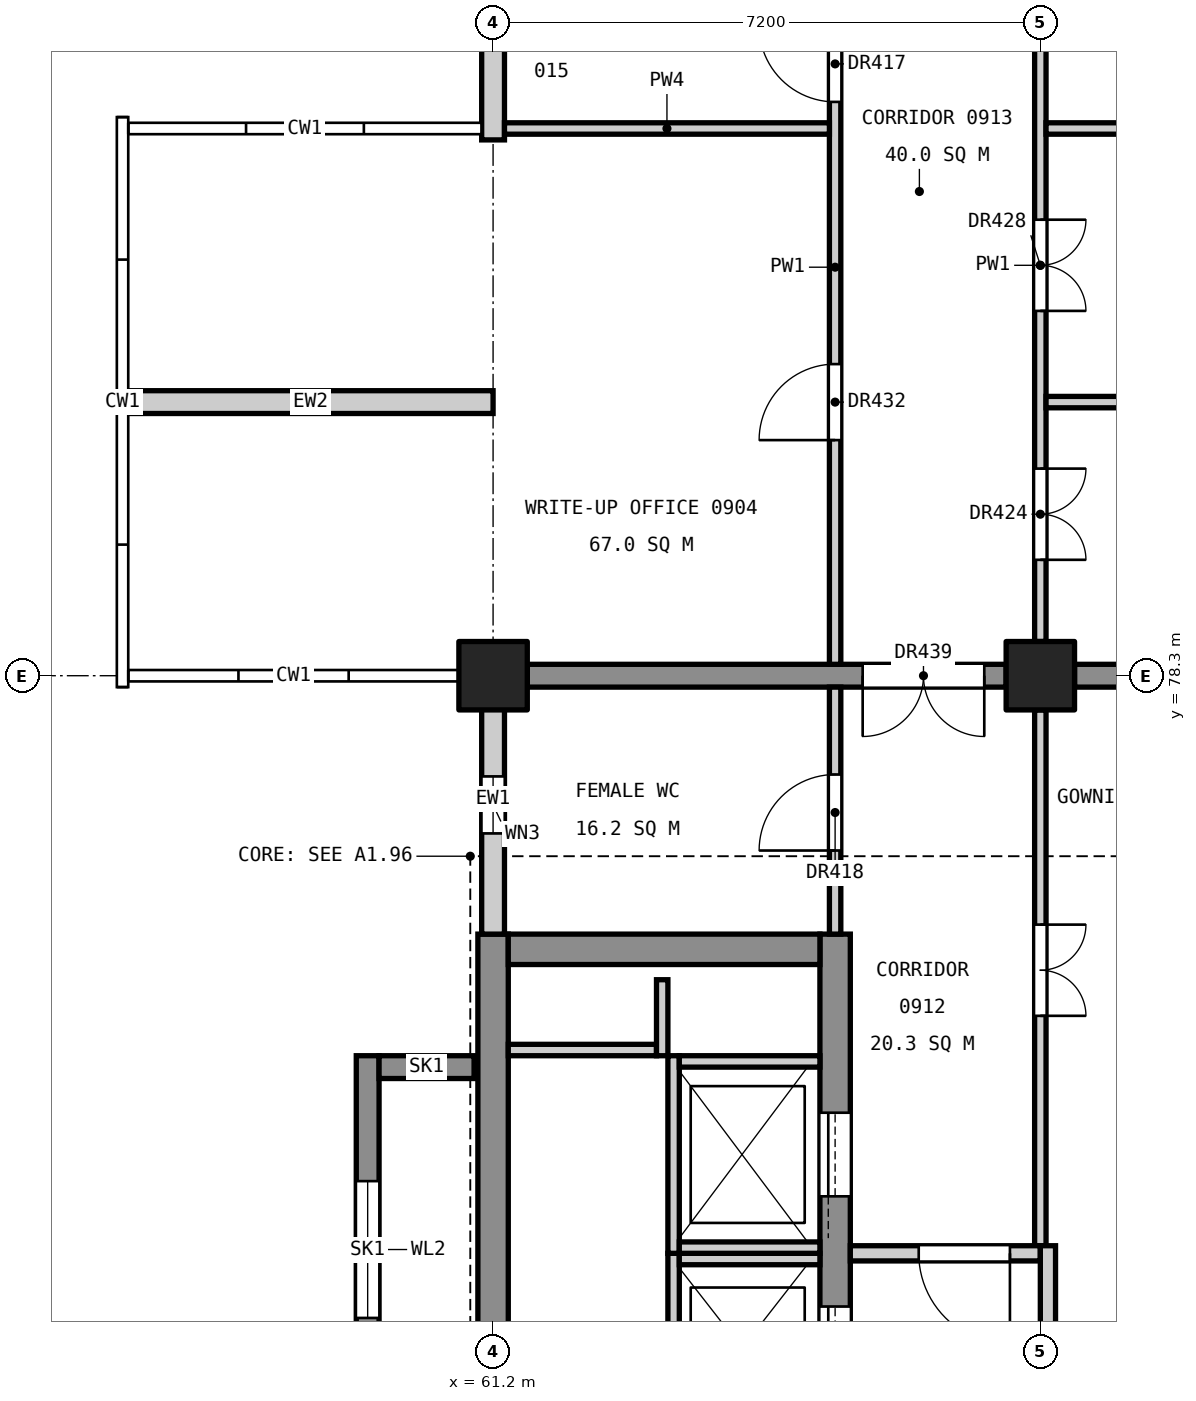
"""IFC4 building model, lengths in metres.
Left out: names, types, materials, properties, quantities, classifications, styles, units other than length and angle.
Written with IfcOpenShell. Run it as: python <this file> out.ifc"""

import sys

from ifc_helpers import new_model, si_unit, direction, frame, frame_2d, origin, origin_2d, place, context, subcontext, project, spatial, rectangle, extrude, element, fill, save


model = new_model("IFC4")
c1 = context("Model", 3, precision=1e-05, world=origin(), true_north=direction((0.0, 1.0)))
c2 = subcontext(c1, "Body", "Model", "MODEL_VIEW")
j1 = project(units=[si_unit("LENGTHUNIT", "METRE"), si_unit("PLANEANGLEUNIT", "RADIAN")], contexts=[c1])
p1 = place(None, origin())
s1 = spatial("IfcSite", under=j1, at=p1, CompositionType="ELEMENT")
p2 = place(p1, origin())
s2 = spatial("IfcBuilding", under=s1, at=p2, CompositionType="ELEMENT")
p3 = place(p2, frame((0.0, 0.0, 46.2)))
s3 = spatial("IfcBuildingStorey", under=s2, at=p3, CompositionType="ELEMENT", Elevation=46.2)
for number, where, z_axis, x_axis in (
    (1, (61.2, 78.3, 0.0), (0.0, 0.0, 1.0), (1.0, 0.0, 0.0)),
    (2, (68.4, 78.3, 0.0), (0.0, 0.0, 1.0), (1.0, 0.0, 0.0)),
):
    element("IfcColumn", number, at=place(p3, frame(where, z_axis=z_axis, x_axis=x_axis)), inside=s3, PredefinedType="COLUMN", context=c2, shape_type="SweptSolid", body=[
        extrude(rectangle(XDim=0.9, YDim=0.9, at=origin_2d()), origin(), (0.0, 0.0, 1.0), 4.8),
    ])
p4 = place(p3, frame((61.2, 60.1, 0.0), z_axis=(0.0, 0.0, 1.0), x_axis=(0.0, 1.0, 0.0)))
e3 = element("IfcWall", 3, at=p4, inside=s3, PredefinedType="SHEAR", context=c2, shape_type="SweptSolid", body=[
    extrude(rectangle(XDim=14.8, YDim=0.4, at=frame_2d((7.4, 0.0))), origin(), (0.0, 0.0, 1.0), 4.55),
])
p5 = place(p4, frame((6.11, 0.0, 3.4)))
e4 = element("IfcOpeningElement", 4, at=p5, cuts=e3, PredefinedType="OPENING", context=c2, shape_type="SweptSolid", body=[
    extrude(rectangle(XDim=1.2, YDim=0.9, at=frame_2d((0.6, 0.45))), frame((0.0, 0.21, 0.0), z_axis=(0.0, -1.0, 0.0), x_axis=(1.0, 0.0, 0.0)), (0.0, 0.0, 1.0), 0.42),
])
p6 = place(p3, frame((65.7, 60.1, 0.0), z_axis=(0.0, 0.0, 1.0), x_axis=(0.0, 1.0, 0.0)))
e5 = element("IfcWall", 5, at=p6, inside=s3, PredefinedType="SHEAR", context=c2, shape_type="SweptSolid", body=[
    extrude(rectangle(XDim=14.8, YDim=0.4, at=frame_2d((7.4, 0.0))), origin(), (0.0, 0.0, 1.0), 4.55),
])
p7 = place(p6, frame((0.5, 0.0, 0.0)))
e6 = element("IfcOpeningElement", 6, at=p7, cuts=e5, PredefinedType="OPENING", context=c2, shape_type="SweptSolid", body=[
    extrude(rectangle(XDim=1.4, YDim=2.1, at=frame_2d((0.7, 1.05))), frame((0.0, 0.21, 0.0), z_axis=(0.0, -1.0, 0.0), x_axis=(1.0, 0.0, 0.0)), (0.0, 0.0, 1.0), 0.42),
])
p8 = place(p6, frame((8.8, 0.0, 0.0)))
e7 = element("IfcOpeningElement", 7, at=p8, cuts=e5, PredefinedType="OPENING", context=c2, shape_type="SweptSolid", body=[
    extrude(rectangle(XDim=1.1, YDim=2.1, at=frame_2d((0.55, 1.05))), frame((0.0, 0.21, 0.0), z_axis=(0.0, -1.0, 0.0), x_axis=(1.0, 0.0, 0.0)), (0.0, 0.0, 1.0), 0.42),
])
p9 = place(p6, frame((11.35, 0.0, 0.0)))
e8 = element("IfcOpeningElement", 8, at=p9, cuts=e5, PredefinedType="OPENING", context=c2, shape_type="SweptSolid", body=[
    extrude(rectangle(XDim=1.1, YDim=2.1, at=frame_2d((0.55, 1.05))), frame((0.0, 0.21, 0.0), z_axis=(0.0, -1.0, 0.0), x_axis=(1.0, 0.0, 0.0)), (0.0, 0.0, 1.0), 0.42),
])
p10 = place(p3, frame((61.4, 74.7, 0.0), z_axis=(0.0, 0.0, 1.0), x_axis=(1.0, 0.0, 0.0)))
e9 = element("IfcWall", 9, at=p10, inside=s3, PredefinedType="SHEAR", context=c2, shape_type="SweptSolid", body=[
    extrude(rectangle(XDim=4.1, YDim=0.4, at=frame_2d((2.05, 0.0))), origin(), (0.0, 0.0, 1.0), 4.55),
])
p11 = place(p3, frame((59.55, 68.2, 0.0), z_axis=(0.0, 0.0, 1.0), x_axis=(0.0, 1.0, 0.0)))
e10 = element("IfcWall", 10, at=p11, inside=s3, PredefinedType="SHEAR", context=c2, shape_type="SweptSolid", body=[
    extrude(rectangle(XDim=5.1, YDim=0.3, at=frame_2d((2.55, 0.0))), origin(), (0.0, 0.0, 1.0), 4.8),
])
p12 = place(p11, frame((1.65, 0.0, 3.0)))
e11 = element("IfcOpeningElement", 11, at=p12, cuts=e10, PredefinedType="OPENING", context=c2, shape_type="SweptSolid", body=[
    extrude(rectangle(XDim=1.8, YDim=1.2, at=frame_2d((0.9, 0.6))), frame((0.0, 0.16, 0.0), z_axis=(0.0, -1.0, 0.0), x_axis=(1.0, 0.0, 0.0)), (0.0, 0.0, 1.0), 0.32),
])
p13 = place(p3, frame((60.95, 73.15, 0.0), z_axis=(0.0, 0.0, 1.0), x_axis=(-1.0, 0.0, 0.0)))
e12 = element("IfcWall", 12, at=p13, inside=s3, PredefinedType="SHEAR", context=c2, shape_type="SweptSolid", body=[
    extrude(rectangle(XDim=1.25, YDim=0.3, at=frame_2d((0.625, 0.0))), origin(), (0.0, 0.0, 1.0), 4.8),
])
p14 = place(p3, frame((61.65, 78.3, 0.0), z_axis=(0.0, 0.0, 1.0), x_axis=(1.0, 0.0, 0.0)))
e13 = element("IfcWall", 13, at=p14, inside=s3, PredefinedType="SHEAR", context=c2, shape_type="SweptSolid", body=[
    extrude(rectangle(XDim=6.3, YDim=0.3, at=frame_2d((3.15, 0.0))), origin(), (0.0, 0.0, 1.0), 4.55),
])
p15 = place(p14, frame((4.413, 0.0, 0.0)))
e14 = element("IfcOpeningElement", 14, at=p15, cuts=e13, PredefinedType="OPENING", context=c2, shape_type="SweptSolid", body=[
    extrude(rectangle(XDim=1.6, YDim=2.1, at=frame_2d((0.8, 1.05))), frame((0.0, 0.16, 0.0), z_axis=(0.0, -1.0, 0.0), x_axis=(1.0, 0.0, 0.0)), (0.0, 0.0, 1.0), 0.32),
])
p16 = place(p3, frame((68.85, 78.3, 0.0), z_axis=(0.0, 0.0, 1.0), x_axis=(1.0, 0.0, 0.0)))
e15 = element("IfcWall", 15, at=p16, inside=s3, PredefinedType="SHEAR", context=c2, shape_type="SweptSolid", body=[
    extrude(rectangle(XDim=9.9, YDim=0.3, at=frame_2d((4.95, 0.0))), origin(), (0.0, 0.0, 1.0), 4.55),
])
p17 = place(p3, frame((63.575, 68.2, 0.0), z_axis=(0.0, 0.0, 1.0), x_axis=(0.0, 1.0, 0.0)))
e16 = element("IfcWall", 16, at=p17, inside=s3, PredefinedType="SOLIDWALL", context=c2, shape_type="SweptSolid", body=[
    extrude(rectangle(XDim=2.5, YDim=0.15, at=frame_2d((1.25, 0.0))), origin(), (0.0, 0.0, 1.0), 4.8),
])
p18 = place(p3, frame((63.65, 70.625, 0.0), z_axis=(0.0, 0.0, 1.0), x_axis=(1.0, 0.0, 0.0)))
e17 = element("IfcWall", 17, at=p18, inside=s3, PredefinedType="SOLIDWALL", context=c2, shape_type="SweptSolid", body=[
    extrude(rectangle(XDim=1.85, YDim=0.15, at=frame_2d((0.925, 0.0))), origin(), (0.0, 0.0, 1.0), 4.8),
])
p19 = place(p3, frame((63.575, 70.7, 0.0), z_axis=(0.0, 0.0, 1.0), x_axis=(0.0, 1.0, 0.0)))
e18 = element("IfcWall", 18, at=p19, inside=s3, PredefinedType="SOLIDWALL", context=c2, shape_type="SweptSolid", body=[
    extrude(rectangle(XDim=2.6, YDim=0.15, at=frame_2d((1.3, 0.0))), origin(), (0.0, 0.0, 1.0), 4.8),
])
for number, where, z_axis, x_axis in (
    (19, (63.65, 70.775, 0.0), (0.0, 0.0, 1.0), (1.0, 0.0, 0.0)),
    (20, (63.65, 73.225, 0.0), (0.0, 0.0, 1.0), (1.0, 0.0, 0.0)),
):
    element("IfcWall", number, at=place(p3, frame(where, z_axis=z_axis, x_axis=x_axis)), inside=s3, PredefinedType="SOLIDWALL", context=c2, shape_type="SweptSolid", body=[
        extrude(rectangle(XDim=1.85, YDim=0.15, at=frame_2d((0.925, 0.0))), origin(), (0.0, 0.0, 1.0), 4.8),
    ])
p20 = place(p3, frame((61.4, 73.375, 0.0), z_axis=(0.0, 0.0, 1.0), x_axis=(1.0, 0.0, 0.0)))
e21 = element("IfcWall", 21, at=p20, inside=s3, PredefinedType="SOLIDWALL", context=c2, shape_type="SweptSolid", body=[
    extrude(rectangle(XDim=1.95, YDim=0.15, at=frame_2d((0.975, 0.0))), origin(), (0.0, 0.0, 1.0), 4.8),
])
p21 = place(p3, frame((63.425, 73.3, 0.0), z_axis=(0.0, 0.0, 1.0), x_axis=(0.0, 1.0, 0.0)))
e22 = element("IfcWall", 22, at=p21, inside=s3, PredefinedType="SOLIDWALL", context=c2, shape_type="SweptSolid", body=[
    extrude(rectangle(XDim=1.0, YDim=0.15, at=frame_2d((0.5, 0.0))), origin(), (0.0, 0.0, 1.0), 4.8),
])
p22 = place(p3, frame((61.2, 74.9, 0.0), z_axis=(0.0, 0.0, 1.0), x_axis=(0.0, 1.0, 0.0)))
e23 = element("IfcWall", 23, at=p22, inside=s3, PredefinedType="STANDARD", context=c2, shape_type="SweptSolid", body=[
    extrude(rectangle(XDim=3.55, YDim=0.3, at=frame_2d((1.775, 0.0))), origin(), (0.0, 0.0, 1.0), 3.65),
])
p23 = place(p22, frame((1.325, 0.0, 0.8)))
e24 = element("IfcOpeningElement", 24, at=p23, cuts=e23, PredefinedType="OPENING", context=c2, shape_type="SweptSolid", body=[
    extrude(rectangle(XDim=0.75, YDim=1.2, at=frame_2d((0.375, 0.6))), frame((0.0, 0.16, 0.0), z_axis=(0.0, -1.0, 0.0), x_axis=(1.0, 0.0, 0.0)), (0.0, 0.0, 1.0), 0.32),
])
p24 = place(p3, frame((61.2, 85.35, 0.0), z_axis=(0.0, 0.0, 1.0), x_axis=(0.0, 1.0, 0.0)))
e25 = element("IfcWall", 25, at=p24, inside=s3, PredefinedType="STANDARD", context=c2, shape_type="SweptSolid", body=[
    extrude(rectangle(XDim=3.55, YDim=0.3, at=frame_2d((1.775, 0.0))), origin(), (0.0, 0.0, 1.0), 3.65),
])
p25 = place(p3, frame((56.4, 81.9, 0.0), z_axis=(0.0, 0.0, 1.0), x_axis=(1.0, 0.0, 0.0)))
e26 = element("IfcWall", 26, at=p25, inside=s3, PredefinedType="STANDARD", context=c2, shape_type="SweptSolid", body=[
    extrude(rectangle(XDim=4.8, YDim=0.3, at=frame_2d((2.4, 0.0))), origin(), (0.0, 0.0, 1.0), 3.65),
])
p26 = place(p3, frame((65.7, 74.9, 0.0), z_axis=(0.0, 0.0, 1.0), x_axis=(0.0, 1.0, 0.0)))
e27 = element("IfcWall", 27, at=p26, inside=s3, PredefinedType="PARTITIONING", context=c2, shape_type="SweptSolid", body=[
    extrude(rectangle(XDim=3.25, YDim=0.15, at=frame_2d((1.625, 0.0))), origin(), (0.0, 0.0, 1.0), 3.55),
])
p27 = place(p26, frame((1.1, 0.0, 0.0)))
e28 = element("IfcOpeningElement", 28, at=p27, cuts=e27, PredefinedType="OPENING", context=c2, shape_type="SweptSolid", body=[
    extrude(rectangle(XDim=1.0, YDim=2.1, at=frame_2d((0.5, 1.05))), frame((0.0, 0.085, 0.0), z_axis=(0.0, -1.0, 0.0), x_axis=(1.0, 0.0, 0.0)), (0.0, 0.0, 1.0), 0.17),
])
p28 = place(p3, frame((65.7, 78.45, 0.0), z_axis=(0.0, 0.0, 1.0), x_axis=(0.0, 1.0, 0.0)))
e29 = element("IfcWall", 29, at=p28, inside=s3, PredefinedType="PARTITIONING", context=c2, shape_type="SweptSolid", body=[
    extrude(rectangle(XDim=10.45, YDim=0.15, at=frame_2d((5.225, 0.0))), origin(), (0.0, 0.0, 1.0), 3.55),
])
p29 = place(p28, frame((7.4, 0.0, 0.0)))
e30 = element("IfcOpeningElement", 30, at=p29, cuts=e29, PredefinedType="OPENING", context=c2, shape_type="SweptSolid", body=[
    extrude(rectangle(XDim=1.0, YDim=2.1, at=frame_2d((0.5, 1.05))), frame((0.0, 0.085, 0.0), z_axis=(0.0, -1.0, 0.0), x_axis=(1.0, 0.0, 0.0)), (0.0, 0.0, 1.0), 0.17),
])
p30 = place(p28, frame((9.2, 0.0, 0.0)))
e31 = element("IfcOpeningElement", 31, at=p30, cuts=e29, PredefinedType="OPENING", context=c2, shape_type="SweptSolid", body=[
    extrude(rectangle(XDim=1.0, YDim=2.1, at=frame_2d((0.5, 1.05))), frame((0.0, 0.085, 0.0), z_axis=(0.0, -1.0, 0.0), x_axis=(1.0, 0.0, 0.0)), (0.0, 0.0, 1.0), 0.17),
])
p31 = place(p28, frame((2.95, 0.0, 0.0)))
e32 = element("IfcOpeningElement", 32, at=p31, cuts=e29, PredefinedType="OPENING", context=c2, shape_type="SweptSolid", body=[
    extrude(rectangle(XDim=1.0, YDim=2.1, at=frame_2d((0.5, 1.05))), frame((0.0, 0.085, 0.0), z_axis=(0.0, -1.0, 0.0), x_axis=(1.0, 0.0, 0.0)), (0.0, 0.0, 1.0), 0.17),
])
p32 = place(p3, frame((61.35, 85.5, 0.0), z_axis=(0.0, 0.0, 1.0), x_axis=(1.0, 0.0, 0.0)))
e33 = element("IfcWall", 33, at=p32, inside=s3, PredefinedType="PARTITIONING", context=c2, shape_type="SweptSolid", body=[
    extrude(rectangle(XDim=4.275, YDim=0.15, at=frame_2d((2.137, 0.0))), origin(), (0.0, 0.0, 1.0), 3.85),
])
p33 = place(p3, frame((68.4, 70.8, 0.0), z_axis=(0.0, 0.0, 1.0), x_axis=(0.0, 1.0, 0.0)))
e34 = element("IfcWall", 34, at=p33, inside=s3, PredefinedType="PARTITIONING", context=c2, shape_type="SweptSolid", body=[
    extrude(rectangle(XDim=7.05, YDim=0.15, at=frame_2d((3.525, 0.0))), origin(), (0.0, 0.0, 1.0), 3.55),
])
p34 = place(p33, frame((3.025, 0.0, 0.0)))
e35 = element("IfcOpeningElement", 35, at=p34, cuts=e34, PredefinedType="OPENING", context=c2, shape_type="SweptSolid", body=[
    extrude(rectangle(XDim=1.2, YDim=2.1, at=frame_2d((0.6, 1.05))), frame((0.0, 0.085, 0.0), z_axis=(0.0, -1.0, 0.0), x_axis=(1.0, 0.0, 0.0)), (0.0, 0.0, 1.0), 0.17),
])
p35 = place(p3, frame((68.4, 78.75, 0.0), z_axis=(0.0, 0.0, 1.0), x_axis=(0.0, 1.0, 0.0)))
e36 = element("IfcWall", 36, at=p35, inside=s3, PredefinedType="PARTITIONING", context=c2, shape_type="SweptSolid", body=[
    extrude(rectangle(XDim=9.9, YDim=0.15, at=frame_2d((4.95, 0.0))), origin(), (0.0, 0.0, 1.0), 3.55),
])
p36 = place(p35, frame((1.075, 0.0, 0.0)))
e37 = element("IfcOpeningElement", 37, at=p36, cuts=e36, PredefinedType="OPENING", context=c2, shape_type="SweptSolid", body=[
    extrude(rectangle(XDim=1.2, YDim=2.1, at=frame_2d((0.6, 1.05))), frame((0.0, 0.085, 0.0), z_axis=(0.0, -1.0, 0.0), x_axis=(1.0, 0.0, 0.0)), (0.0, 0.0, 1.0), 0.17),
])
p37 = place(p35, frame((7.825, 0.0, 0.0)))
e38 = element("IfcOpeningElement", 38, at=p37, cuts=e36, PredefinedType="OPENING", context=c2, shape_type="SweptSolid", body=[
    extrude(rectangle(XDim=1.2, YDim=2.1, at=frame_2d((0.6, 1.05))), frame((0.0, 0.085, 0.0), z_axis=(0.0, -1.0, 0.0), x_axis=(1.0, 0.0, 0.0)), (0.0, 0.0, 1.0), 0.17),
])
p38 = place(p35, frame((4.35, 0.0, 0.0)))
e39 = element("IfcOpeningElement", 39, at=p38, cuts=e36, PredefinedType="OPENING", context=c2, shape_type="SweptSolid", body=[
    extrude(rectangle(XDim=1.2, YDim=2.1, at=frame_2d((0.6, 1.05))), frame((0.0, 0.085, 0.0), z_axis=(0.0, -1.0, 0.0), x_axis=(1.0, 0.0, 0.0)), (0.0, 0.0, 1.0), 0.17),
])
p39 = place(p3, frame((65.9, 70.7, 0.0), z_axis=(0.0, 0.0, 1.0), x_axis=(1.0, 0.0, 0.0)))
e40 = element("IfcWall", 40, at=p39, inside=s3, PredefinedType="PARTITIONING", context=c2, shape_type="SweptSolid", body=[
    extrude(rectangle(XDim=2.5, YDim=0.2, at=frame_2d((1.25, 0.0))), origin(), (0.0, 0.0, 1.0), 3.55),
])
p40 = place(p39, frame((0.9, 0.0, 0.0)))
e41 = element("IfcOpeningElement", 41, at=p40, cuts=e40, PredefinedType="OPENING", context=c2, shape_type="SweptSolid", body=[
    extrude(rectangle(XDim=1.2, YDim=2.1, at=frame_2d((0.6, 1.05))), frame((0.0, 0.11, 0.0), z_axis=(0.0, -1.0, 0.0), x_axis=(1.0, 0.0, 0.0)), (0.0, 0.0, 1.0), 0.22),
])
p41 = place(p3, frame((68.5, 67.95, 0.0), z_axis=(0.0, 0.0, 1.0), x_axis=(0.0, 1.0, 0.0)))
e42 = element("IfcWall", 42, at=p41, inside=s3, PredefinedType="PARTITIONING", context=c2, shape_type="SweptSolid", body=[
    extrude(rectangle(XDim=2.85, YDim=0.2, at=frame_2d((1.425, 0.0))), origin(), (0.0, 0.0, 1.0), 3.55),
])
for number, where, z_axis, x_axis in (
    (43, (68.475, 81.9, 0.0), (0.0, 0.0, 1.0), (1.0, 0.0, 0.0)),
    (44, (68.475, 85.5, 0.0), (0.0, 0.0, 1.0), (1.0, 0.0, 0.0)),
):
    element("IfcWall", number, at=place(p3, frame(where, z_axis=z_axis, x_axis=x_axis)), inside=s3, PredefinedType="PARTITIONING", context=c2, shape_type="SweptSolid", body=[
        extrude(rectangle(XDim=10.575, YDim=0.15, at=frame_2d((5.288, 0.0))), origin(), (0.0, 0.0, 1.0), 3.85),
    ])
p42 = place(p8, origin())
e45 = element("IfcDoor", 45, at=p42, inside=s3, OperationType="SLIDING_TO_LEFT", PredefinedType="DOOR", context=c2, shape_type="SweptSolid", body=[
    extrude(rectangle(XDim=1.1, YDim=2.1, at=frame_2d((0.55, 1.05))), frame((0.0, 0.025, 0.0), z_axis=(0.0, -1.0, 0.0), x_axis=(1.0, 0.0, 0.0)), (0.0, 0.0, 1.0), 0.05),
])
fill(e7, e45)
p43 = place(p9, origin())
e46 = element("IfcDoor", 46, at=p43, inside=s3, OperationType="SLIDING_TO_LEFT", PredefinedType="DOOR", context=c2, shape_type="SweptSolid", body=[
    extrude(rectangle(XDim=1.1, YDim=2.1, at=frame_2d((0.55, 1.05))), frame((0.0, 0.025, 0.0), z_axis=(0.0, -1.0, 0.0), x_axis=(1.0, 0.0, 0.0)), (0.0, 0.0, 1.0), 0.05),
])
fill(e8, e46)
p44 = place(p23, origin())
e47 = element("IfcWindow", 47, at=p44, inside=s3, PartitioningType="SINGLE_PANEL", PredefinedType="WINDOW", context=c2, shape_type="SweptSolid", body=[
    extrude(rectangle(XDim=0.75, YDim=1.2, at=frame_2d((0.375, 0.6))), frame((0.0, 0.03, 0.0), z_axis=(0.0, -1.0, 0.0), x_axis=(1.0, 0.0, 0.0)), (0.0, 0.0, 1.0), 0.06),
])
fill(e24, e47)
p45 = place(p12, origin())
e48 = element("IfcWindow", 48, at=p45, inside=s3, PartitioningType="SINGLE_PANEL", PredefinedType="WINDOW", context=c2, shape_type="SweptSolid", body=[
    extrude(rectangle(XDim=1.8, YDim=1.2, at=frame_2d((0.9, 0.6))), frame((0.0, 0.03, 0.0), z_axis=(0.0, -1.0, 0.0), x_axis=(1.0, 0.0, 0.0)), (0.0, 0.0, 1.0), 0.06),
])
fill(e11, e48)
p46 = place(p29, origin())
e49 = element("IfcDoor", 49, at=p46, inside=s3, OperationType="SINGLE_SWING_RIGHT", PredefinedType="DOOR", context=c2, shape_type="SweptSolid", body=[
    extrude(rectangle(XDim=1.0, YDim=2.1, at=frame_2d((0.5, 1.05))), frame((0.0, 0.025, 0.0), z_axis=(0.0, -1.0, 0.0), x_axis=(1.0, 0.0, 0.0)), (0.0, 0.0, 1.0), 0.05),
])
fill(e30, e49)
p47 = place(p27, origin())
e50 = element("IfcDoor", 50, at=p47, inside=s3, OperationType="SINGLE_SWING_LEFT", PredefinedType="DOOR", context=c2, shape_type="SweptSolid", body=[
    extrude(rectangle(XDim=1.0, YDim=2.1, at=frame_2d((0.5, 1.05))), frame((0.0, 0.025, 0.0), z_axis=(0.0, -1.0, 0.0), x_axis=(1.0, 0.0, 0.0)), (0.0, 0.0, 1.0), 0.05),
])
fill(e28, e50)
p48 = place(p34, frame((1.2, 0.0, 0.0), z_axis=(0.0, 0.0, 1.0), x_axis=(-1.0, 0.0, 0.0)))
e51 = element("IfcDoor", 51, at=p48, inside=s3, OperationType="DOUBLE_DOOR_SINGLE_SWING", PredefinedType="DOOR", context=c2, shape_type="SweptSolid", body=[
    extrude(rectangle(XDim=1.2, YDim=2.1, at=frame_2d((0.6, 1.05))), frame((0.0, 0.025, 0.0), z_axis=(0.0, -1.0, 0.0), x_axis=(1.0, 0.0, 0.0)), (0.0, 0.0, 1.0), 0.05),
])
fill(e35, e51)
p49 = place(p36, frame((1.2, 0.0, 0.0), z_axis=(0.0, 0.0, 1.0), x_axis=(-1.0, 0.0, 0.0)))
e52 = element("IfcDoor", 52, at=p49, inside=s3, OperationType="DOUBLE_DOOR_SINGLE_SWING", PredefinedType="DOOR", context=c2, shape_type="SweptSolid", body=[
    extrude(rectangle(XDim=1.2, YDim=2.1, at=frame_2d((0.6, 1.05))), frame((0.0, 0.025, 0.0), z_axis=(0.0, -1.0, 0.0), x_axis=(1.0, 0.0, 0.0)), (0.0, 0.0, 1.0), 0.05),
])
fill(e37, e52)
p50 = place(p38, frame((1.2, 0.0, 0.0), z_axis=(0.0, 0.0, 1.0), x_axis=(-1.0, 0.0, 0.0)))
e53 = element("IfcDoor", 53, at=p50, inside=s3, OperationType="DOUBLE_DOOR_SINGLE_SWING", PredefinedType="DOOR", context=c2, shape_type="SweptSolid", body=[
    extrude(rectangle(XDim=1.2, YDim=2.1, at=frame_2d((0.6, 1.05))), frame((0.0, 0.025, 0.0), z_axis=(0.0, -1.0, 0.0), x_axis=(1.0, 0.0, 0.0)), (0.0, 0.0, 1.0), 0.05),
])
fill(e39, e53)
p51 = place(p31, origin())
e54 = element("IfcDoor", 54, at=p51, inside=s3, OperationType="SINGLE_SWING_LEFT", PredefinedType="DOOR", context=c2, shape_type="SweptSolid", body=[
    extrude(rectangle(XDim=1.0, YDim=2.1, at=frame_2d((0.5, 1.05))), frame((0.0, 0.025, 0.0), z_axis=(0.0, -1.0, 0.0), x_axis=(1.0, 0.0, 0.0)), (0.0, 0.0, 1.0), 0.05),
])
fill(e32, e54)
p52 = place(p40, frame((1.2, 0.0, 0.0), z_axis=(0.0, 0.0, 1.0), x_axis=(-1.0, 0.0, 0.0)))
e55 = element("IfcDoor", 55, at=p52, inside=s3, OperationType="SINGLE_SWING_LEFT", PredefinedType="DOOR", context=c2, shape_type="SweptSolid", body=[
    extrude(rectangle(XDim=1.2, YDim=2.1, at=frame_2d((0.6, 1.05))), frame((0.0, 0.025, 0.0), z_axis=(0.0, -1.0, 0.0), x_axis=(1.0, 0.0, 0.0)), (0.0, 0.0, 1.0), 0.05),
])
fill(e41, e55)
p53 = place(p15, frame((1.6, 0.0, 0.0), z_axis=(0.0, 0.0, 1.0), x_axis=(-1.0, 0.0, 0.0)))
e56 = element("IfcDoor", 56, at=p53, inside=s3, OperationType="DOUBLE_DOOR_SINGLE_SWING", PredefinedType="DOOR", context=c2, shape_type="SweptSolid", body=[
    extrude(rectangle(XDim=1.6, YDim=2.1, at=frame_2d((0.8, 1.05))), frame((0.0, 0.025, 0.0), z_axis=(0.0, -1.0, 0.0), x_axis=(1.0, 0.0, 0.0)), (0.0, 0.0, 1.0), 0.05),
])
fill(e14, e56)
save(model, sys.argv[1])
